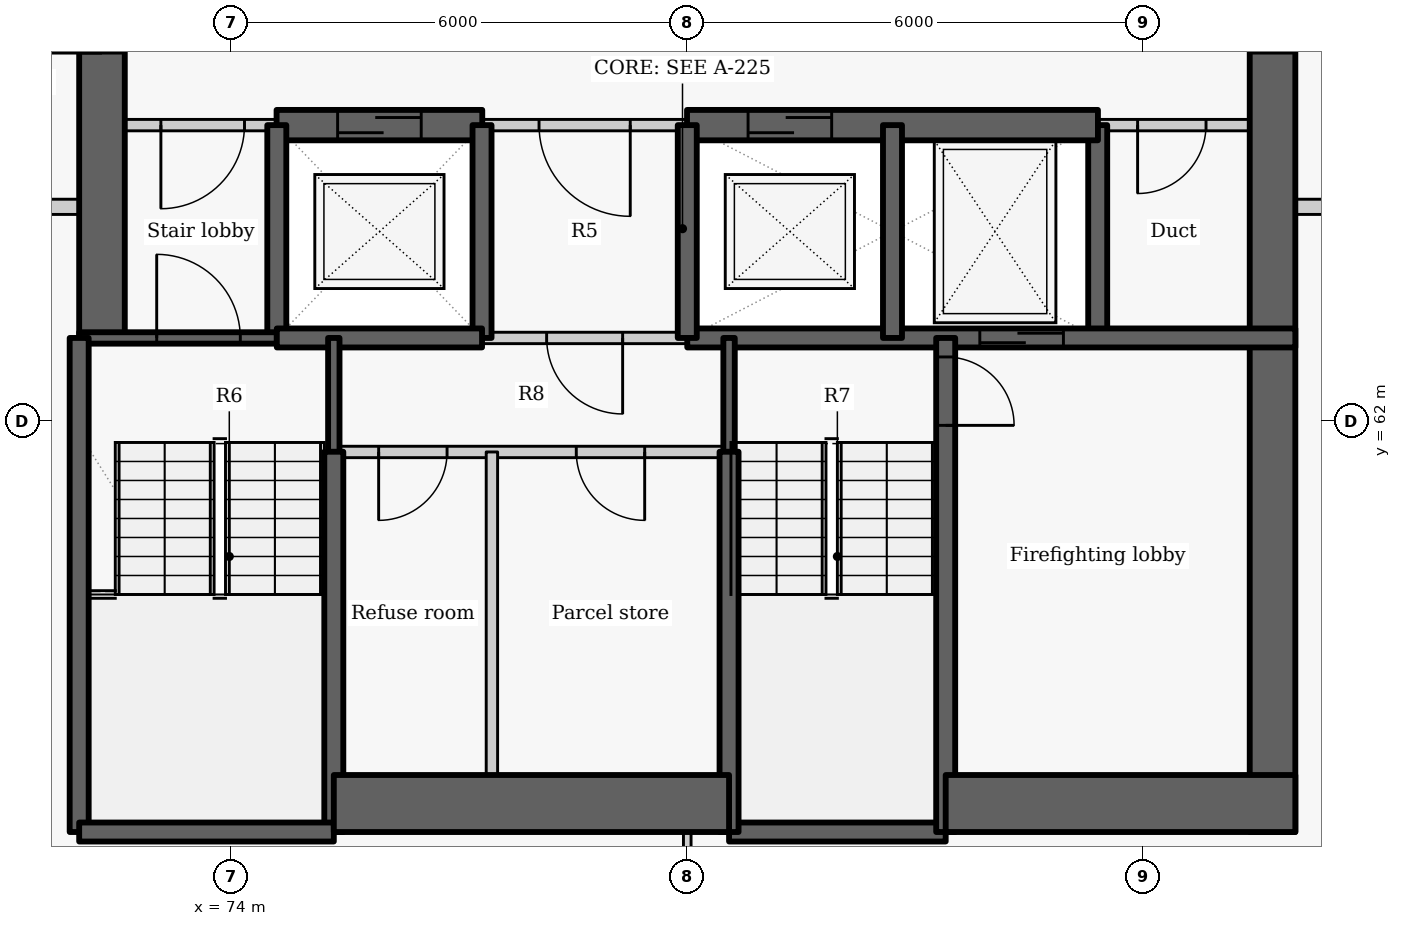
"""IFC4 building model, lengths in metres.
Left out: names, types, materials, properties, quantities, classifications, styles, units other than length and angle.
Written with IfcOpenShell. Run it as: python <this file> out.ifc"""

import sys

from ifc_helpers import new_model, si_unit, direction, frame, frame_2d, origin, place, context, subcontext, project, spatial, rectangle, extrude, element, fill, save


model = new_model("IFC4")
c1 = context("Model", 3, precision=1e-05, world=origin(), true_north=direction((0.0, 1.0)))
c2 = subcontext(c1, "Body", "Model", "MODEL_VIEW")
j1 = project(units=[si_unit("LENGTHUNIT", "METRE"), si_unit("PLANEANGLEUNIT", "RADIAN")], contexts=[c1])
p1 = place(None, origin())
s1 = spatial("IfcSite", under=j1, at=p1, CompositionType="ELEMENT")
p2 = place(p1, origin())
s2 = spatial("IfcBuilding", under=s1, at=p2, CompositionType="ELEMENT")
p3 = place(p2, frame((0.0, 0.0, 130.5)))
s3 = spatial("IfcBuildingStorey", under=s2, at=p3, CompositionType="ELEMENT", Elevation=130.5)
p4 = place(p3, frame((72.3, 63.1, -0.275), z_axis=(0.0, 0.0, 1.0), x_axis=(0.0, 1.0, 0.0)))
e1 = element("IfcWall", 1, at=p4, inside=s3, PredefinedType="SHEAR", context=c2, shape_type="SweptSolid", body=[
    extrude(rectangle(XDim=9.1, YDim=0.6, at=frame_2d((4.55, 0.0))), origin(), (0.0, 0.0, 1.0), 3.3),
])
p5 = place(p4, frame((3.748, 0.0, 0.275)))
e2 = element("IfcOpeningElement", 2, at=p5, cuts=e1, PredefinedType="OPENING", context=c2, shape_type="SweptSolid", body=[
    extrude(rectangle(XDim=1.5, YDim=2.1, at=frame_2d((0.75, 1.05))), frame((0.0, 0.31, 0.0), z_axis=(0.0, -1.0, 0.0), x_axis=(1.0, 0.0, 0.0)), (0.0, 0.0, 1.0), 0.62),
])
p6 = place(p3, frame((85.4, 63.1, -0.275), z_axis=(0.0, 0.0, 1.0), x_axis=(0.0, 1.0, 0.0)))
e3 = element("IfcWall", 3, at=p6, inside=s3, PredefinedType="SHEAR", context=c2, shape_type="SweptSolid", body=[
    extrude(rectangle(XDim=2.8, YDim=0.25, at=frame_2d((1.4, 0.0))), origin(), (0.0, 0.0, 1.0), 3.3),
])
p7 = place(p3, frame((87.7, 72.2, -0.275), z_axis=(0.0, 0.0, 1.0), x_axis=(0.0, -1.0, 0.0)))
e4 = element("IfcWall", 4, at=p7, inside=s3, PredefinedType="SHEAR", context=c2, shape_type="SweptSolid", body=[
    extrude(rectangle(XDim=15.6, YDim=0.6, at=frame_2d((7.8, 0.0))), origin(), (0.0, 0.0, 1.0), 3.3),
])
p8 = place(p7, frame((3.852, 0.0, 0.275)))
e5 = element("IfcOpeningElement", 5, at=p8, cuts=e4, PredefinedType="OPENING", context=c2, shape_type="SweptSolid", body=[
    extrude(rectangle(XDim=1.5, YDim=2.1, at=frame_2d((0.75, 1.05))), frame((0.0, 0.31, 0.0), z_axis=(0.0, -1.0, 0.0), x_axis=(1.0, 0.0, 0.0)), (0.0, 0.0, 1.0), 0.62),
])
p9 = place(p3, frame((74.603, 65.9, 0.0), z_axis=(0.0, 0.0, 1.0), x_axis=(-1.0, 0.0, 0.0)))
e6 = element("IfcWall", 6, at=p9, inside=s3, PredefinedType="PARTITIONING", context=c2, shape_type="SweptSolid", body=[
    extrude(rectangle(XDim=2.603, YDim=0.15, at=frame_2d((1.302, 0.0))), origin(), (0.0, 0.0, 1.0), 3.025),
])
p10 = place(p9, frame((0.428, 0.0, 0.0)))
e7 = element("IfcOpeningElement", 7, at=p10, cuts=e6, PredefinedType="OPENING", context=c2, shape_type="SweptSolid", body=[
    extrude(rectangle(XDim=1.1, YDim=2.1, at=frame_2d((0.55, 1.05))), frame((0.0, 0.085, 0.0), z_axis=(0.0, -1.0, 0.0), x_axis=(1.0, 0.0, 0.0)), (0.0, 0.0, 1.0), 0.17),
])
p11 = place(p3, frame((80.003, 65.9, 0.0), z_axis=(0.0, 0.0, 1.0), x_axis=(-1.0, 0.0, 0.0)))
e8 = element("IfcWall", 8, at=p11, inside=s3, PredefinedType="PARTITIONING", context=c2, shape_type="SweptSolid", body=[
    extrude(rectangle(XDim=2.706, YDim=0.15, at=frame_2d((1.353, 0.0))), origin(), (0.0, 0.0, 1.0), 3.025),
])
p12 = place(p11, frame((0.753, 0.0, 0.0)))
e9 = element("IfcOpeningElement", 9, at=p12, cuts=e8, PredefinedType="OPENING", context=c2, shape_type="SweptSolid", body=[
    extrude(rectangle(XDim=1.2, YDim=2.1, at=frame_2d((0.6, 1.05))), frame((0.0, 0.085, 0.0), z_axis=(0.0, -1.0, 0.0), x_axis=(1.0, 0.0, 0.0)), (0.0, 0.0, 1.0), 0.17),
])
p13 = place(p3, frame((88.0, 65.9, 0.0), z_axis=(0.0, 0.0, 1.0), x_axis=(-1.0, 0.0, 0.0)))
e10 = element("IfcWall", 10, at=p13, inside=s3, PredefinedType="PARTITIONING", context=c2, shape_type="SweptSolid", body=[
    extrude(rectangle(XDim=2.603, YDim=0.15, at=frame_2d((1.302, 0.0))), origin(), (0.0, 0.0, 1.0), 3.025),
])
p14 = place(p13, frame((1.175, 0.0, 0.0)))
e11 = element("IfcOpeningElement", 11, at=p14, cuts=e10, PredefinedType="OPENING", context=c2, shape_type="SweptSolid", body=[
    extrude(rectangle(XDim=0.9, YDim=2.1, at=frame_2d((0.45, 1.05))), frame((0.0, 0.085, 0.0), z_axis=(0.0, -1.0, 0.0), x_axis=(1.0, 0.0, 0.0)), (0.0, 0.0, 1.0), 0.17),
])
p15 = place(p3, frame((74.597, 65.9, -0.275), z_axis=(0.0, 0.0, 1.0), x_axis=(1.0, 0.0, 0.0)))
e12 = element("IfcWall", 12, at=p15, inside=s3, PredefinedType="SHEAR", context=c2, shape_type="SweptSolid", body=[
    extrude(rectangle(XDim=2.706, YDim=0.4, at=frame_2d((1.353, 0.0))), origin(), (0.0, 0.0, 1.0), 3.3),
])
p16 = place(p15, frame((0.803, 0.0, 0.275)))
e13 = element("IfcOpeningElement", 13, at=p16, cuts=e12, PredefinedType="OPENING", context=c2, shape_type="SweptSolid", body=[
    extrude(rectangle(XDim=1.1, YDim=2.1, at=frame_2d((0.55, 1.05))), frame((0.0, 0.21, 0.0), z_axis=(0.0, -1.0, 0.0), x_axis=(1.0, 0.0, 0.0)), (0.0, 0.0, 1.0), 0.42),
])
p17 = place(p3, frame((79.997, 65.9, -0.275), z_axis=(0.0, 0.0, 1.0), x_axis=(1.0, 0.0, 0.0)))
e14 = element("IfcWall", 14, at=p17, inside=s3, PredefinedType="SHEAR", context=c2, shape_type="SweptSolid", body=[
    extrude(rectangle(XDim=5.406, YDim=0.4, at=frame_2d((2.703, 0.0))), origin(), (0.0, 0.0, 1.0), 3.3),
])
p18 = place(p17, frame((0.803, 0.0, 0.275)))
e15 = element("IfcOpeningElement", 15, at=p18, cuts=e14, PredefinedType="OPENING", context=c2, shape_type="SweptSolid", body=[
    extrude(rectangle(XDim=1.1, YDim=2.1, at=frame_2d((0.55, 1.05))), frame((0.0, 0.21, 0.0), z_axis=(0.0, -1.0, 0.0), x_axis=(1.0, 0.0, 0.0)), (0.0, 0.0, 1.0), 0.42),
])
p19 = place(p3, frame((74.6, 63.1, -0.275), z_axis=(0.0, 0.0, 1.0), x_axis=(0.0, 1.0, 0.0)))
e16 = element("IfcWall", 16, at=p19, inside=s3, PredefinedType="SHEAR", context=c2, shape_type="SweptSolid", body=[
    extrude(rectangle(XDim=2.8, YDim=0.25, at=frame_2d((1.4, 0.0))), origin(), (0.0, 0.0, 1.0), 3.3),
])
p20 = place(p3, frame((72.0, 63.1, -0.275), z_axis=(0.0, 0.0, 1.0), x_axis=(1.0, 0.0, 0.0)))
e17 = element("IfcWall", 17, at=p20, inside=s3, PredefinedType="SHEAR", context=c2, shape_type="SweptSolid", body=[
    extrude(rectangle(XDim=2.6, YDim=0.15, at=frame_2d((1.3, 0.0))), origin(), (0.0, 0.0, 1.0), 3.3),
])
p21 = place(p20, frame((1.02, 0.0, 0.275)))
e18 = element("IfcOpeningElement", 18, at=p21, cuts=e17, PredefinedType="OPENING", context=c2, shape_type="SweptSolid", body=[
    extrude(rectangle(XDim=1.1, YDim=2.1, at=frame_2d((0.55, 1.05))), frame((0.0, 0.085, 0.0), z_axis=(0.0, -1.0, 0.0), x_axis=(1.0, 0.0, 0.0)), (0.0, 0.0, 1.0), 0.17),
])
p22 = place(p3, frame((77.3, 63.1, -0.275), z_axis=(0.0, 0.0, 1.0), x_axis=(0.0, 1.0, 0.0)))
e19 = element("IfcWall", 19, at=p22, inside=s3, PredefinedType="SHEAR", context=c2, shape_type="SweptSolid", body=[
    extrude(rectangle(XDim=2.8, YDim=0.25, at=frame_2d((1.4, 0.0))), origin(), (0.0, 0.0, 1.0), 3.3),
])
p23 = place(p3, frame((74.6, 63.1, -0.275), z_axis=(0.0, 0.0, 1.0), x_axis=(1.0, 0.0, 0.0)))
e20 = element("IfcWall", 20, at=p23, inside=s3, PredefinedType="SHEAR", context=c2, shape_type="SweptSolid", body=[
    extrude(rectangle(XDim=2.7, YDim=0.25, at=frame_2d((1.35, 0.0))), origin(), (0.0, 0.0, 1.0), 3.3),
])
p24 = place(p3, frame((80.0, 63.1, -0.275), z_axis=(0.0, 0.0, 1.0), x_axis=(1.0, 0.0, 0.0)))
e21 = element("IfcWall", 21, at=p24, inside=s3, PredefinedType="SHEAR", context=c2, shape_type="SweptSolid", body=[
    extrude(rectangle(XDim=8.0, YDim=0.25, at=frame_2d((4.0, 0.0))), origin(), (0.0, 0.0, 1.0), 3.3),
])
p25 = place(p24, frame((3.849, 0.0, 0.275)))
e22 = element("IfcOpeningElement", 22, at=p25, cuts=e21, PredefinedType="OPENING", context=c2, shape_type="SweptSolid", body=[
    extrude(rectangle(XDim=1.1, YDim=2.1, at=frame_2d((0.55, 1.05))), frame((0.0, 0.135, 0.0), z_axis=(0.0, -1.0, 0.0), x_axis=(1.0, 0.0, 0.0)), (0.0, 0.0, 1.0), 0.27),
])
p26 = place(p3, frame((80.0, 63.1, -0.275), z_axis=(0.0, 0.0, 1.0), x_axis=(0.0, 1.0, 0.0)))
e23 = element("IfcWall", 23, at=p26, inside=s3, PredefinedType="SHEAR", context=c2, shape_type="SweptSolid", body=[
    extrude(rectangle(XDim=2.8, YDim=0.25, at=frame_2d((1.4, 0.0))), origin(), (0.0, 0.0, 1.0), 3.3),
])
p27 = place(p3, frame((80.0, 63.1, 0.0), z_axis=(0.0, 0.0, 1.0), x_axis=(-1.0, 0.0, 0.0)))
e24 = element("IfcWall", 24, at=p27, inside=s3, PredefinedType="PARTITIONING", context=c2, shape_type="SweptSolid", body=[
    extrude(rectangle(XDim=2.7, YDim=0.15, at=frame_2d((1.35, 0.0))), origin(), (0.0, 0.0, 1.0), 3.025),
])
p28 = place(p27, frame((0.85, 0.0, 0.0)))
e25 = element("IfcOpeningElement", 25, at=p28, cuts=e24, PredefinedType="OPENING", context=c2, shape_type="SweptSolid", body=[
    extrude(rectangle(XDim=1.0, YDim=2.1, at=frame_2d((0.5, 1.05))), frame((0.0, 0.085, 0.0), z_axis=(0.0, -1.0, 0.0), x_axis=(1.0, 0.0, 0.0)), (0.0, 0.0, 1.0), 0.17),
])
p29 = place(p3, frame((82.7, 63.1, -0.275), z_axis=(0.0, 0.0, 1.0), x_axis=(0.0, 1.0, 0.0)))
e26 = element("IfcWall", 26, at=p29, inside=s3, PredefinedType="SHEAR", context=c2, shape_type="SweptSolid", body=[
    extrude(rectangle(XDim=2.8, YDim=0.25, at=frame_2d((1.4, 0.0))), origin(), (0.0, 0.0, 1.0), 3.3),
])
p30 = place(p3, frame((75.35, 61.597, -0.275), z_axis=(0.0, 0.0, 1.0), x_axis=(0.0, 1.0, 0.0)))
e27 = element("IfcWall", 27, at=p30, inside=s3, PredefinedType="SHEAR", context=c2, shape_type="SweptSolid", body=[
    extrude(rectangle(XDim=1.503, YDim=0.15, at=frame_2d((0.751, 0.0))), origin(), (0.0, 0.0, 1.0), 3.3),
])
p31 = place(p3, frame((75.35, 56.6, -0.275), z_axis=(0.0, 0.0, 1.0), x_axis=(0.0, 1.0, 0.0)))
e28 = element("IfcWall", 28, at=p31, inside=s3, PredefinedType="SHEAR", context=c2, shape_type="SweptSolid", body=[
    extrude(rectangle(XDim=5.003, YDim=0.25, at=frame_2d((2.501, 0.0))), origin(), (0.0, 0.0, 1.0), 3.3),
])
p32 = place(p3, frame((72.0, 56.6, -0.275), z_axis=(0.0, 0.0, 1.0), x_axis=(0.0, 1.0, 0.0)))
e29 = element("IfcWall", 29, at=p32, inside=s3, PredefinedType="SHEAR", context=c2, shape_type="SweptSolid", body=[
    extrude(rectangle(XDim=6.5, YDim=0.25, at=frame_2d((3.25, 0.0))), origin(), (0.0, 0.0, 1.0), 3.3),
])
p33 = place(p3, frame((72.0, 56.6, -0.275), z_axis=(0.0, 0.0, 1.0), x_axis=(1.0, 0.0, 0.0)))
e30 = element("IfcWall", 30, at=p33, inside=s3, PredefinedType="SHEAR", context=c2, shape_type="SweptSolid", body=[
    extrude(rectangle(XDim=3.35, YDim=0.25, at=frame_2d((1.675, 0.0))), origin(), (0.0, 0.0, 1.0), 3.3),
])
p34 = place(p3, frame((80.55, 56.6, -0.275), z_axis=(0.0, 0.0, 1.0), x_axis=(1.0, 0.0, 0.0)))
e31 = element("IfcWall", 31, at=p34, inside=s3, PredefinedType="SHEAR", context=c2, shape_type="SweptSolid", body=[
    extrude(rectangle(XDim=2.85, YDim=0.25, at=frame_2d((1.425, 0.0))), origin(), (0.0, 0.0, 1.0), 3.3),
])
p35 = place(p3, frame((83.4, 63.1, -0.275), z_axis=(0.0, 0.0, 1.0), x_axis=(0.0, -1.0, 0.0)))
e32 = element("IfcWall", 32, at=p35, inside=s3, PredefinedType="SHEAR", context=c2, shape_type="SweptSolid", body=[
    extrude(rectangle(XDim=6.5, YDim=0.25, at=frame_2d((3.25, 0.0))), origin(), (0.0, 0.0, 1.0), 3.3),
])
p36 = place(p35, frame((0.25, 0.0, 0.275)))
e33 = element("IfcOpeningElement", 33, at=p36, cuts=e32, PredefinedType="OPENING", context=c2, shape_type="SweptSolid", body=[
    extrude(rectangle(XDim=0.9, YDim=2.1, at=frame_2d((0.45, 1.05))), frame((0.0, 0.135, 0.0), z_axis=(0.0, -1.0, 0.0), x_axis=(1.0, 0.0, 0.0)), (0.0, 0.0, 1.0), 0.27),
])
p37 = place(p3, frame((80.55, 61.597, -0.275), z_axis=(0.0, 0.0, 1.0), x_axis=(0.0, 1.0, 0.0)))
e34 = element("IfcWall", 34, at=p37, inside=s3, PredefinedType="SHEAR", context=c2, shape_type="SweptSolid", body=[
    extrude(rectangle(XDim=1.503, YDim=0.15, at=frame_2d((0.751, 0.0))), origin(), (0.0, 0.0, 1.0), 3.3),
])
p38 = place(p3, frame((80.55, 56.6, -0.275), z_axis=(0.0, 0.0, 1.0), x_axis=(0.0, 1.0, 0.0)))
e35 = element("IfcWall", 35, at=p38, inside=s3, PredefinedType="SHEAR", context=c2, shape_type="SweptSolid", body=[
    extrude(rectangle(XDim=5.003, YDim=0.25, at=frame_2d((2.501, 0.0))), origin(), (0.0, 0.0, 1.0), 3.3),
])
p39 = place(p3, frame((75.35, 56.975, -0.275), z_axis=(0.0, 0.0, 1.0), x_axis=(1.0, 0.0, 0.0)))
e36 = element("IfcWall", 36, at=p39, inside=s3, PredefinedType="SHEAR", context=c2, shape_type="SweptSolid", body=[
    extrude(rectangle(XDim=5.2, YDim=0.75, at=frame_2d((2.6, 0.0))), origin(), (0.0, 0.0, 1.0), 3.3),
])
p40 = place(p3, frame((83.4, 56.975, -0.275), z_axis=(0.0, 0.0, 1.0), x_axis=(1.0, 0.0, 0.0)))
e37 = element("IfcWall", 37, at=p40, inside=s3, PredefinedType="SHEAR", context=c2, shape_type="SweptSolid", body=[
    extrude(rectangle(XDim=4.6, YDim=0.75, at=frame_2d((2.3, 0.0))), origin(), (0.0, 0.0, 1.0), 3.3),
])
p41 = place(p3, frame((80.55, 61.6, 0.0), z_axis=(0.0, 0.0, 1.0), x_axis=(-1.0, 0.0, 0.0)))
e38 = element("IfcWall", 38, at=p41, inside=s3, PredefinedType="PARTITIONING", context=c2, shape_type="SweptSolid", body=[
    extrude(rectangle(XDim=5.2, YDim=0.15, at=frame_2d((2.6, 0.0))), origin(), (0.0, 0.0, 1.0), 3.025),
])
p42 = place(p41, frame((3.71, 0.0, 0.0)))
e39 = element("IfcOpeningElement", 39, at=p42, cuts=e38, PredefinedType="OPENING", context=c2, shape_type="SweptSolid", body=[
    extrude(rectangle(XDim=0.9, YDim=2.1, at=frame_2d((0.45, 1.05))), frame((0.0, 0.085, 0.0), z_axis=(0.0, -1.0, 0.0), x_axis=(1.0, 0.0, 0.0)), (0.0, 0.0, 1.0), 0.17),
])
p43 = place(p41, frame((1.11, 0.0, 0.0)))
e40 = element("IfcOpeningElement", 40, at=p43, cuts=e38, PredefinedType="OPENING", context=c2, shape_type="SweptSolid", body=[
    extrude(rectangle(XDim=0.9, YDim=2.1, at=frame_2d((0.45, 1.05))), frame((0.0, 0.085, 0.0), z_axis=(0.0, -1.0, 0.0), x_axis=(1.0, 0.0, 0.0)), (0.0, 0.0, 1.0), 0.17),
])
p44 = place(p3, frame((77.43, 56.6, 0.0), z_axis=(0.0, 0.0, 1.0), x_axis=(0.0, 1.0, 0.0)))
e41 = element("IfcWall", 41, at=p44, inside=s3, PredefinedType="PARTITIONING", context=c2, shape_type="SweptSolid", body=[
    extrude(rectangle(XDim=5.0, YDim=0.15, at=frame_2d((2.5, 0.0))), origin(), (0.0, 0.0, 1.0), 3.025),
])
p45 = place(p3, frame((70.577, 64.825, 0.0), z_axis=(0.0, 0.0, 1.0), x_axis=(1.0, 0.0, 0.0)))
e42 = element("IfcWall", 42, at=p45, inside=s3, PredefinedType="PARTITIONING", context=c2, shape_type="SweptSolid", body=[
    extrude(rectangle(XDim=1.423, YDim=0.2, at=frame_2d((0.711, 0.0))), origin(), (0.0, 0.0, 1.0), 3.025),
])
p46 = place(p3, frame((88.0, 64.825, 0.0), z_axis=(0.0, 0.0, 1.0), x_axis=(1.0, 0.0, 0.0)))
e43 = element("IfcWall", 43, at=p46, inside=s3, PredefinedType="PARTITIONING", context=c2, shape_type="SweptSolid", body=[
    extrude(rectangle(XDim=2.463, YDim=0.2, at=frame_2d((1.231, 0.0))), origin(), (0.0, 0.0, 1.0), 2.505),
])
p47 = place(p3, frame((80.0, 56.3, 0.0), z_axis=(0.0, 0.0, 1.0), x_axis=(0.0, 1.0, 0.0)))
e44 = element("IfcWall", 44, at=p47, inside=s3, PredefinedType="PARTITIONING", context=c2, shape_type="SweptSolid", body=[
    extrude(rectangle(XDim=0.3, YDim=0.1, at=frame_2d((0.15, 0.0))), origin(), (0.0, 0.0, 1.0), 3.025),
])
p48 = place(p10, origin())
e45 = element("IfcDoor", 45, at=p48, inside=s3, OperationType="SINGLE_SWING_RIGHT", PredefinedType="DOOR", context=c2, shape_type="SweptSolid", body=[
    extrude(rectangle(XDim=1.1, YDim=2.1, at=frame_2d((0.55, 1.05))), frame((0.0, 0.025, 0.0), z_axis=(0.0, -1.0, 0.0), x_axis=(1.0, 0.0, 0.0)), (0.0, 0.0, 1.0), 0.05),
])
fill(e7, e45)
p49 = place(p16, origin())
e46 = element("IfcDoor", 46, at=p49, inside=s3, OperationType="SLIDING_TO_LEFT", PredefinedType="DOOR", context=c2, shape_type="SweptSolid", body=[
    extrude(rectangle(XDim=1.1, YDim=2.1, at=frame_2d((0.55, 1.05))), frame((0.0, 0.025, 0.0), z_axis=(0.0, -1.0, 0.0), x_axis=(1.0, 0.0, 0.0)), (0.0, 0.0, 1.0), 0.05),
])
fill(e13, e46)
p50 = place(p12, origin())
e47 = element("IfcDoor", 47, at=p50, inside=s3, OperationType="DOUBLE_DOOR_SINGLE_SWING", PredefinedType="DOOR", context=c2, shape_type="SweptSolid", body=[
    extrude(rectangle(XDim=1.2, YDim=2.1, at=frame_2d((0.6, 1.05))), frame((0.0, 0.025, 0.0), z_axis=(0.0, -1.0, 0.0), x_axis=(1.0, 0.0, 0.0)), (0.0, 0.0, 1.0), 0.05),
])
fill(e9, e47)
p51 = place(p18, origin())
e48 = element("IfcDoor", 48, at=p51, inside=s3, OperationType="SLIDING_TO_LEFT", PredefinedType="DOOR", context=c2, shape_type="SweptSolid", body=[
    extrude(rectangle(XDim=1.1, YDim=2.1, at=frame_2d((0.55, 1.05))), frame((0.0, 0.025, 0.0), z_axis=(0.0, -1.0, 0.0), x_axis=(1.0, 0.0, 0.0)), (0.0, 0.0, 1.0), 0.05),
])
fill(e15, e48)
p52 = place(p25, origin())
e49 = element("IfcDoor", 49, at=p52, inside=s3, OperationType="SLIDING_TO_LEFT", PredefinedType="DOOR", context=c2, shape_type="SweptSolid", body=[
    extrude(rectangle(XDim=1.1, YDim=2.1, at=frame_2d((0.55, 1.05))), frame((0.0, 0.025, 0.0), z_axis=(0.0, -1.0, 0.0), x_axis=(1.0, 0.0, 0.0)), (0.0, 0.0, 1.0), 0.05),
])
fill(e22, e49)
p53 = place(p14, origin())
e50 = element("IfcDoor", 50, at=p53, inside=s3, OperationType="SINGLE_SWING_RIGHT", PredefinedType="DOOR", context=c2, shape_type="SweptSolid", body=[
    extrude(rectangle(XDim=0.9, YDim=2.1, at=frame_2d((0.45, 1.05))), frame((0.0, 0.025, 0.0), z_axis=(0.0, -1.0, 0.0), x_axis=(1.0, 0.0, 0.0)), (0.0, 0.0, 1.0), 0.05),
])
fill(e11, e50)
p54 = place(p28, origin())
e51 = element("IfcDoor", 51, at=p54, inside=s3, OperationType="SINGLE_SWING_LEFT", PredefinedType="DOOR", context=c2, shape_type="SweptSolid", body=[
    extrude(rectangle(XDim=1.0, YDim=2.1, at=frame_2d((0.5, 1.05))), frame((0.0, 0.025, 0.0), z_axis=(0.0, -1.0, 0.0), x_axis=(1.0, 0.0, 0.0)), (0.0, 0.0, 1.0), 0.05),
])
fill(e25, e51)
p55 = place(p42, origin())
e52 = element("IfcDoor", 52, at=p55, inside=s3, OperationType="SINGLE_SWING_RIGHT", PredefinedType="DOOR", context=c2, shape_type="SweptSolid", body=[
    extrude(rectangle(XDim=0.9, YDim=2.1, at=frame_2d((0.45, 1.05))), frame((0.0, 0.025, 0.0), z_axis=(0.0, -1.0, 0.0), x_axis=(1.0, 0.0, 0.0)), (0.0, 0.0, 1.0), 0.05),
])
fill(e39, e52)
p56 = place(p43, origin())
e53 = element("IfcDoor", 53, at=p56, inside=s3, OperationType="SINGLE_SWING_LEFT", PredefinedType="DOOR", context=c2, shape_type="SweptSolid", body=[
    extrude(rectangle(XDim=0.9, YDim=2.1, at=frame_2d((0.45, 1.05))), frame((0.0, 0.025, 0.0), z_axis=(0.0, -1.0, 0.0), x_axis=(1.0, 0.0, 0.0)), (0.0, 0.0, 1.0), 0.05),
])
fill(e40, e53)
p57 = place(p21, origin())
e54 = element("IfcDoor", 54, at=p57, inside=s3, OperationType="SINGLE_SWING_LEFT", PredefinedType="DOOR", context=c2, shape_type="SweptSolid", body=[
    extrude(rectangle(XDim=1.1, YDim=2.1, at=frame_2d((0.55, 1.05))), frame((0.0, 0.025, 0.0), z_axis=(0.0, -1.0, 0.0), x_axis=(1.0, 0.0, 0.0)), (0.0, 0.0, 1.0), 0.05),
])
fill(e18, e54)
p58 = place(p36, origin())
e55 = element("IfcDoor", 55, at=p58, inside=s3, OperationType="SINGLE_SWING_RIGHT", PredefinedType="DOOR", context=c2, shape_type="SweptSolid", body=[
    extrude(rectangle(XDim=0.9, YDim=2.1, at=frame_2d((0.45, 1.05))), frame((0.0, 0.025, 0.0), z_axis=(0.0, -1.0, 0.0), x_axis=(1.0, 0.0, 0.0)), (0.0, 0.0, 1.0), 0.05),
])
fill(e33, e55)
p59 = place(p8, origin())
e56 = element("IfcDoor", 56, at=p59, inside=s3, OperationType="DOUBLE_DOOR_SINGLE_SWING", PredefinedType="DOOR", context=c2, shape_type="SweptSolid", body=[
    extrude(rectangle(XDim=1.5, YDim=2.1, at=frame_2d((0.75, 1.05))), frame((0.0, 0.025, 0.0), z_axis=(0.0, -1.0, 0.0), x_axis=(1.0, 0.0, 0.0)), (0.0, 0.0, 1.0), 0.05),
])
fill(e5, e56)
p60 = place(p5, origin())
e57 = element("IfcDoor", 57, at=p60, inside=s3, OperationType="DOUBLE_DOOR_SINGLE_SWING", PredefinedType="DOOR", context=c2, shape_type="SweptSolid", body=[
    extrude(rectangle(XDim=1.5, YDim=2.1, at=frame_2d((0.75, 1.05))), frame((0.0, 0.025, 0.0), z_axis=(0.0, -1.0, 0.0), x_axis=(1.0, 0.0, 0.0)), (0.0, 0.0, 1.0), 0.05),
])
fill(e2, e57)
save(model, sys.argv[1])
